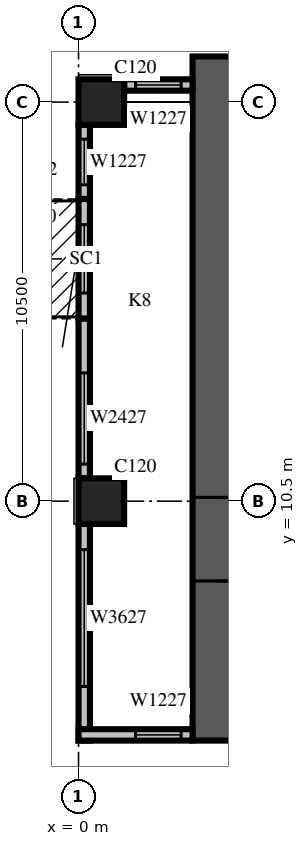
"""IFC4 building model, lengths in metres.
Left out: names, types, materials, properties, quantities, classifications, styles, units other than length and angle.
Written with IfcOpenShell. Run it as: python <this file> out.ifc"""

import sys

from ifc_helpers import new_model, si_unit, direction, frame, frame_2d, origin, origin_2d, place, context, subcontext, project, spatial, rectangle, extrude, source, transform, mapped, element, fill, save


model = new_model("IFC4")
c1 = context("Model", 3, precision=1e-05, world=origin(), true_north=direction((0.0, 1.0)))
c2 = subcontext(c1, "Body", "Model", "MODEL_VIEW")
j1 = project(units=[si_unit("LENGTHUNIT", "METRE"), si_unit("PLANEANGLEUNIT", "RADIAN")], contexts=[c1])
p1 = place(None, origin())
s1 = spatial("IfcSite", under=j1, at=p1, CompositionType="ELEMENT")
p2 = place(p1, origin())
s2 = spatial("IfcBuilding", under=s1, at=p2, CompositionType="ELEMENT")
p3 = place(p2, frame((0.0, 0.0, 78.3)))
s3 = spatial("IfcBuildingStorey", under=s2, at=p3, CompositionType="ELEMENT", Elevation=78.3)
m1 = source(origin(), c2, "Body", "SweptSolid", [
    extrude(rectangle(XDim=1.2, YDim=1.2, at=origin_2d()), origin(), (0.0, 0.0, 1.0), 4.2),
])
for number, where, z_axis, x_axis in (
    (1, (0.6, 10.5, 0.0), (0.0, 0.0, 1.0), (1.0, 0.0, 0.0)),
    (2, (0.6, 21.0, 0.0), (0.0, 0.0, 1.0), (1.0, 0.0, 0.0)),
):
    element("IfcColumn", number, at=place(p3, frame(where, z_axis=z_axis, x_axis=x_axis)), inside=s3, PredefinedType="COLUMN", context=c2, shape_type="MappedRepresentation", body=[
        mapped(m1, transform((0.0, 0.0, 0.0), scale=1.0)),
    ])
m2 = source(origin(), c2, "Body", "SweptSolid", [
    extrude(rectangle(XDim=18.0, YDim=1.2, at=frame_2d((9.0, 0.0))), origin(), (0.0, 0.0, 1.0), 4.2),
])
p4 = place(p3, frame((3.6, 4.2, 0.0), z_axis=(0.0, 0.0, 1.0), x_axis=(0.0, 1.0, 0.0)))
e3 = element("IfcWall", 3, at=p4, inside=s3, PredefinedType="SHEAR", context=c2, shape_type="MappedRepresentation", body=[
    mapped(m2, transform((0.0, 0.0, 0.0), scale=1.0)),
])
m3 = source(origin(), c2, "Body", "SweptSolid", [
    extrude(rectangle(XDim=2.2, YDim=2.1, at=frame_2d((1.1, 1.05))), frame((0.0, 0.61, 0.0), z_axis=(0.0, -1.0, 0.0), x_axis=(1.0, 0.0, 0.0)), (0.0, 0.0, 1.0), 1.22),
])
p5 = place(p4, frame((4.2, 0.0, 0.0)))
e4 = element("IfcOpeningElement", 4, at=p5, cuts=e3, PredefinedType="OPENING", context=c2, shape_type="MappedRepresentation", body=[
    mapped(m3, transform((0.0, 0.0, 0.0), scale=1.0)),
])
m4 = source(origin(), c2, "Body", "SweptSolid", [
    extrude(rectangle(XDim=1.8, YDim=0.3, at=frame_2d((0.9, 0.0))), origin(), (0.0, 0.0, 1.0), 3.8),
])
p6 = place(p3, frame((3.0, 21.45, 0.0), z_axis=(0.0, 0.0, 1.0), x_axis=(-1.0, 0.0, 0.0)))
e5 = element("IfcWall", 5, at=p6, inside=s3, PredefinedType="STANDARD", context=c2, shape_type="MappedRepresentation", body=[
    mapped(m4, transform((0.0, 0.0, 0.0), scale=1.0)),
])
m5 = source(origin(), c2, "Body", "SweptSolid", [
    extrude(rectangle(XDim=1.2, YDim=2.7, at=frame_2d((0.6, 1.35))), frame((0.0, 0.16, 0.0), z_axis=(0.0, -1.0, 0.0), x_axis=(1.0, 0.0, 0.0)), (0.0, 0.0, 1.0), 0.32),
])
p7 = place(p6, frame((0.3, 0.0, 0.6)))
e6 = element("IfcOpeningElement", 6, at=p7, cuts=e5, PredefinedType="OPENING", context=c2, shape_type="MappedRepresentation", body=[
    mapped(m5, transform((0.0, 0.0, 0.0), scale=1.0)),
])
m6 = source(origin(), c2, "Body", "SweptSolid", [
    extrude(rectangle(XDim=1.95, YDim=0.3, at=frame_2d((0.975, 0.0))), origin(), (0.0, 0.0, 1.0), 3.8),
])
p8 = place(p3, frame((0.15, 20.4, 0.0), z_axis=(0.0, 0.0, 1.0), x_axis=(0.0, -1.0, 0.0)))
e7 = element("IfcWall", 7, at=p8, inside=s3, PredefinedType="STANDARD", context=c2, shape_type="MappedRepresentation", body=[
    mapped(m6, transform((0.0, 0.0, 0.0), scale=1.0)),
])
p9 = place(p8, frame((0.375, 0.0, 0.6)))
e8 = element("IfcOpeningElement", 8, at=p9, cuts=e7, PredefinedType="OPENING", context=c2, shape_type="MappedRepresentation", body=[
    mapped(m5, transform((0.0, 0.0, 0.0), scale=1.0)),
])
m7 = source(origin(), c2, "Body", "SweptSolid", [
    extrude(rectangle(XDim=3.15, YDim=0.3, at=frame_2d((1.575, 0.0))), origin(), (0.0, 0.0, 1.0), 3.8),
])
p10 = place(p3, frame((0.15, 18.45, 0.0), z_axis=(0.0, 0.0, 1.0), x_axis=(0.0, -1.0, 0.0)))
e9 = element("IfcWall", 9, at=p10, inside=s3, PredefinedType="STANDARD", context=c2, shape_type="MappedRepresentation", body=[
    mapped(m7, transform((0.0, 0.0, 0.0), scale=1.0)),
])
m8 = source(origin(), c2, "Body", "SweptSolid", [
    extrude(rectangle(XDim=1.8, YDim=2.4, at=frame_2d((0.9, 1.2))), frame((0.0, 0.16, 0.0), z_axis=(0.0, -1.0, 0.0), x_axis=(1.0, 0.0, 0.0)), (0.0, 0.0, 1.0), 0.32),
])
p11 = place(p10, frame((0.675, 0.0, 0.0)))
e10 = element("IfcOpeningElement", 10, at=p11, cuts=e9, PredefinedType="OPENING", context=c2, shape_type="MappedRepresentation", body=[
    mapped(m8, transform((0.0, 0.0, 0.0), scale=1.0)),
])
m9 = source(origin(), c2, "Body", "SweptSolid", [
    extrude(rectangle(XDim=4.2, YDim=0.3, at=frame_2d((2.1, 0.0))), origin(), (0.0, 0.0, 1.0), 3.8),
])
p12 = place(p3, frame((0.15, 15.3, 0.0), z_axis=(0.0, 0.0, 1.0), x_axis=(0.0, -1.0, 0.0)))
e11 = element("IfcWall", 11, at=p12, inside=s3, PredefinedType="STANDARD", context=c2, shape_type="MappedRepresentation", body=[
    mapped(m9, transform((0.0, 0.0, 0.0), scale=1.0)),
])
m10 = source(origin(), c2, "Body", "SweptSolid", [
    extrude(rectangle(XDim=2.4, YDim=2.7, at=frame_2d((1.2, 1.35))), frame((0.0, 0.16, 0.0), z_axis=(0.0, -1.0, 0.0), x_axis=(1.0, 0.0, 0.0)), (0.0, 0.0, 1.0), 0.32),
])
p13 = place(p12, frame((1.425, 0.0, 0.6)))
e12 = element("IfcOpeningElement", 12, at=p13, cuts=e11, PredefinedType="OPENING", context=c2, shape_type="MappedRepresentation", body=[
    mapped(m10, transform((0.0, 0.0, 0.0), scale=1.0)),
])
m11 = source(origin(), c2, "Body", "SweptSolid", [
    extrude(rectangle(XDim=5.7, YDim=0.3, at=frame_2d((2.85, 0.0))), origin(), (0.0, 0.0, 1.0), 3.8),
])
p14 = place(p3, frame((0.15, 9.9, 0.0), z_axis=(0.0, 0.0, 1.0), x_axis=(0.0, -1.0, 0.0)))
e13 = element("IfcWall", 13, at=p14, inside=s3, PredefinedType="STANDARD", context=c2, shape_type="MappedRepresentation", body=[
    mapped(m11, transform((0.0, 0.0, 0.0), scale=1.0)),
])
m12 = source(origin(), c2, "Body", "SweptSolid", [
    extrude(rectangle(XDim=3.6, YDim=2.7, at=frame_2d((1.8, 1.35))), frame((0.0, 0.16, 0.0), z_axis=(0.0, -1.0, 0.0), x_axis=(1.0, 0.0, 0.0)), (0.0, 0.0, 1.0), 0.32),
])
p15 = place(p14, frame((0.675, 0.0, 0.6)))
e14 = element("IfcOpeningElement", 14, at=p15, cuts=e13, PredefinedType="OPENING", context=c2, shape_type="MappedRepresentation", body=[
    mapped(m12, transform((0.0, 0.0, 0.0), scale=1.0)),
])
m13 = source(origin(), c2, "Body", "SweptSolid", [
    extrude(rectangle(XDim=3.0, YDim=0.3, at=frame_2d((1.5, 0.0))), origin(), (0.0, 0.0, 1.0), 3.8),
])
p16 = place(p3, frame((0.0, 4.35, 0.0), z_axis=(0.0, 0.0, 1.0), x_axis=(1.0, 0.0, 0.0)))
e15 = element("IfcWall", 15, at=p16, inside=s3, PredefinedType="STANDARD", context=c2, shape_type="MappedRepresentation", body=[
    mapped(m13, transform((0.0, 0.0, 0.0), scale=1.0)),
])
p17 = place(p16, frame((1.5, 0.0, 0.6)))
e16 = element("IfcOpeningElement", 16, at=p17, cuts=e15, PredefinedType="OPENING", context=c2, shape_type="MappedRepresentation", body=[
    mapped(m5, transform((0.0, 0.0, 0.0), scale=1.0)),
])
m14 = source(origin(), c2, "Body", "SweptSolid", [
    extrude(rectangle(XDim=1.2, YDim=2.7, at=frame_2d((0.6, 1.35))), frame((0.0, 0.03, 0.0), z_axis=(0.0, -1.0, 0.0), x_axis=(1.0, 0.0, 0.0)), (0.0, 0.0, 1.0), 0.06),
])
p18 = place(p7, origin())
e17 = element("IfcWindow", 17, at=p18, inside=s3, PartitioningType="SINGLE_PANEL", PredefinedType="WINDOW", context=c2, shape_type="MappedRepresentation", body=[
    mapped(m14, transform((0.0, 0.0, 0.0), scale=1.0)),
])
fill(e6, e17)
p19 = place(p9, origin())
e18 = element("IfcWindow", 18, at=p19, inside=s3, PartitioningType="SINGLE_PANEL", PredefinedType="WINDOW", context=c2, shape_type="MappedRepresentation", body=[
    mapped(m14, transform((0.0, 0.0, 0.0), scale=1.0)),
])
fill(e8, e18)
m15 = source(origin(), c2, "Body", "SweptSolid", [
    extrude(rectangle(XDim=1.8, YDim=2.4, at=frame_2d((0.9, 1.2))), frame((0.0, 0.025, 0.0), z_axis=(0.0, -1.0, 0.0), x_axis=(1.0, 0.0, 0.0)), (0.0, 0.0, 1.0), 0.05),
])
p20 = place(p11, origin())
e19 = element("IfcDoor", 19, at=p20, inside=s3, OperationType="SLIDING_TO_LEFT", PredefinedType="DOOR", context=c2, shape_type="MappedRepresentation", body=[
    mapped(m15, transform((0.0, 0.0, 0.0), scale=1.0)),
])
fill(e10, e19)
m16 = source(origin(), c2, "Body", "SweptSolid", [
    extrude(rectangle(XDim=2.4, YDim=2.7, at=frame_2d((1.2, 1.35))), frame((0.0, 0.03, 0.0), z_axis=(0.0, -1.0, 0.0), x_axis=(1.0, 0.0, 0.0)), (0.0, 0.0, 1.0), 0.06),
])
p21 = place(p13, origin())
e20 = element("IfcWindow", 20, at=p21, inside=s3, PartitioningType="SINGLE_PANEL", PredefinedType="WINDOW", context=c2, shape_type="MappedRepresentation", body=[
    mapped(m16, transform((0.0, 0.0, 0.0), scale=1.0)),
])
fill(e12, e20)
m17 = source(origin(), c2, "Body", "SweptSolid", [
    extrude(rectangle(XDim=3.6, YDim=2.7, at=frame_2d((1.8, 1.35))), frame((0.0, 0.03, 0.0), z_axis=(0.0, -1.0, 0.0), x_axis=(1.0, 0.0, 0.0)), (0.0, 0.0, 1.0), 0.06),
])
p22 = place(p15, origin())
e21 = element("IfcWindow", 21, at=p22, inside=s3, PartitioningType="SINGLE_PANEL", PredefinedType="WINDOW", context=c2, shape_type="MappedRepresentation", body=[
    mapped(m17, transform((0.0, 0.0, 0.0), scale=1.0)),
])
fill(e14, e21)
p23 = place(p17, origin())
e22 = element("IfcWindow", 22, at=p23, inside=s3, PartitioningType="SINGLE_PANEL", PredefinedType="WINDOW", context=c2, shape_type="MappedRepresentation", body=[
    mapped(m14, transform((0.0, 0.0, 0.0), scale=1.0)),
])
fill(e16, e22)
m18 = source(origin(), c2, "Body", "SweptSolid", [
    extrude(rectangle(XDim=2.2, YDim=2.1, at=frame_2d((1.1, 1.05))), frame((0.0, 0.025, 0.0), z_axis=(0.0, -1.0, 0.0), x_axis=(1.0, 0.0, 0.0)), (0.0, 0.0, 1.0), 0.05),
])
p24 = place(p5, origin())
e23 = element("IfcDoor", 23, at=p24, inside=s3, OperationType="DOUBLE_DOOR_SINGLE_SWING", PredefinedType="DOOR", context=c2, shape_type="MappedRepresentation", body=[
    mapped(m18, transform((0.0, 0.0, 0.0), scale=1.0)),
])
fill(e4, e23)
save(model, sys.argv[1])
